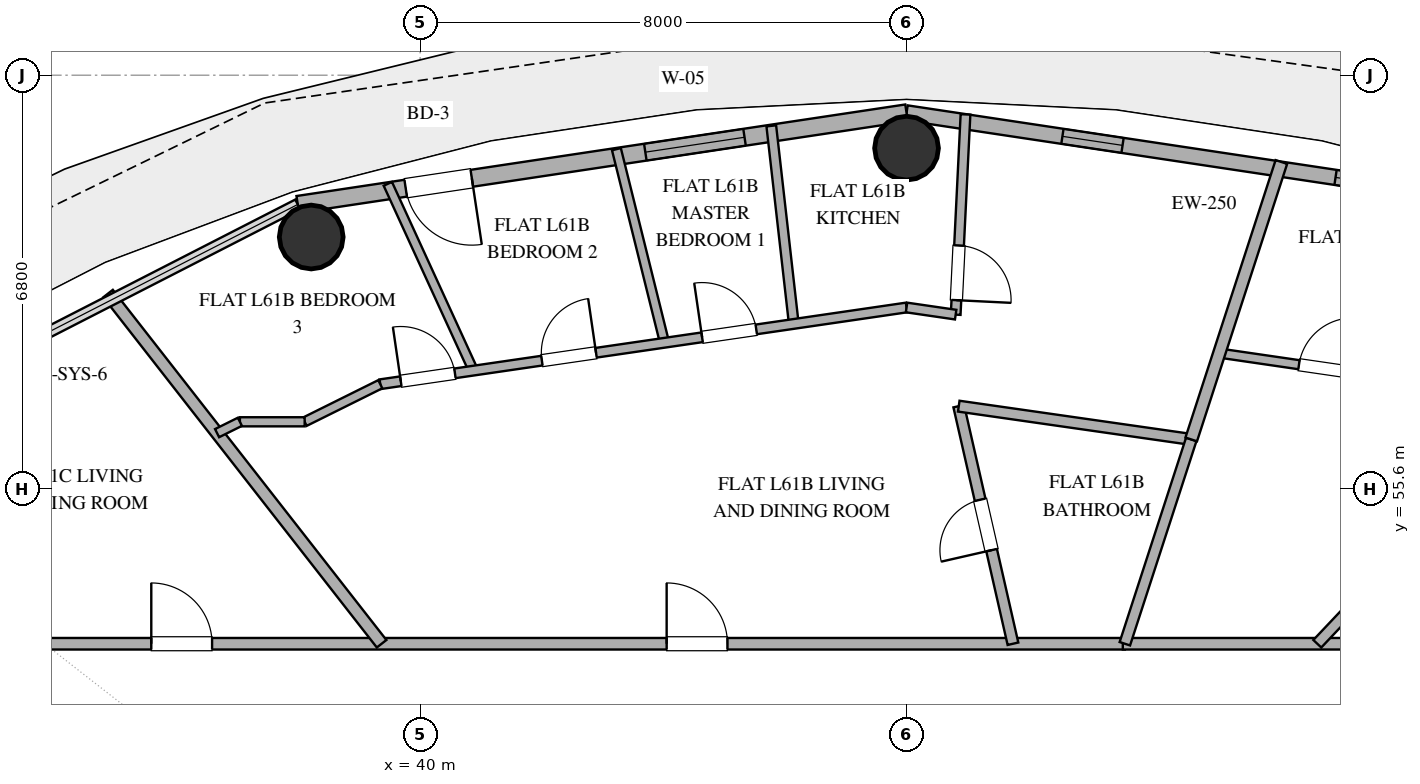
"""IFC4 building model, lengths in metres.
Left out: names, types, materials, properties, quantities, classifications, styles, units other than length and angle.
Written with IfcOpenShell. Run it as: python <this file> out.ifc"""

import sys

from ifc_helpers import new_model, si_unit, direction, frame, frame_2d, origin, origin_2d, place, context, subcontext, project, spatial, rectangle, hollow_circle, extrude, element, fill, save


model = new_model("IFC4")
c1 = context("Model", 3, precision=1e-05, world=origin(), true_north=direction((0.0, 1.0)))
c2 = subcontext(c1, "Body", "Model", "MODEL_VIEW")
j1 = project(units=[si_unit("LENGTHUNIT", "METRE"), si_unit("PLANEANGLEUNIT", "RADIAN")], contexts=[c1])
p1 = place(None, origin())
s1 = spatial("IfcSite", under=j1, at=p1, CompositionType="ELEMENT")
p2 = place(p1, origin())
s2 = spatial("IfcBuilding", under=s1, at=p2, CompositionType="ELEMENT")
p3 = place(p2, frame((0.0, 0.0, 238.8)))
s3 = spatial("IfcBuildingStorey", under=s2, at=p3, CompositionType="ELEMENT", Elevation=238.8)
for number, where, z_axis, x_axis in (
    (1, (48.0, 61.2, 0.0), (0.0, 0.0, 1.0), (1.0, 0.0, 0.0)),
    (2, (38.209, 59.739, 0.0), (0.0, 0.0, 1.0), (1.0, 0.0, 0.0)),
):
    element("IfcColumn", number, at=place(p3, frame(where, z_axis=z_axis, x_axis=x_axis)), inside=s3, PredefinedType="COLUMN", context=c2, shape_type="SweptSolid", body=[
        extrude(hollow_circle(Radius=0.525, WallThickness=0.028, at=origin_2d()), origin(), (0.0, 0.0, 1.0), 3.36),
    ])
p4 = place(p3, frame((58.013, 60.274, 0.0), z_axis=(0.0, 0.0, 1.0), x_axis=(-0.988882522213, 0.148698881169, 0.0)))
e3 = element("IfcWall", 3, at=p4, inside=s3, PredefinedType="SOLIDWALL", context=c2, shape_type="SweptSolid", body=[
    extrude(rectangle(XDim=10.125, YDim=0.25, at=frame_2d((5.062, 0.0))), origin(), (0.0, 0.0, 1.0), 3.36),
])
p5 = place(p4, frame((1.99, 0.0, 0.35)))
e4 = element("IfcOpeningElement", 4, at=p5, cuts=e3, PredefinedType="OPENING", context=c2, shape_type="SweptSolid", body=[
    extrude(rectangle(XDim=1.0, YDim=1.05, at=frame_2d((0.5, 0.525))), frame((0.0, 0.135, 0.0), z_axis=(0.0, -1.0, 0.0), x_axis=(1.0, 0.0, 0.0)), (0.0, 0.0, 1.0), 0.27),
])
p6 = place(p4, frame((6.533, 0.0, 1.42)))
e5 = element("IfcOpeningElement", 5, at=p6, cuts=e3, PredefinedType="OPENING", context=c2, shape_type="SweptSolid", body=[
    extrude(rectangle(XDim=1.0, YDim=1.05, at=frame_2d((0.5, 0.525))), frame((0.0, 0.135, 0.0), z_axis=(0.0, -1.0, 0.0), x_axis=(1.0, 0.0, 0.0)), (0.0, 0.0, 1.0), 0.27),
])
p7 = place(p3, frame((48.0, 61.78, 0.0), z_axis=(0.0, 0.0, 1.0), x_axis=(-0.988882522213, -0.148698881169, 0.0)))
e6 = element("IfcWall", 6, at=p7, inside=s3, PredefinedType="SOLIDWALL", context=c2, shape_type="SweptSolid", body=[
    extrude(rectangle(XDim=10.125, YDim=0.28, at=frame_2d((5.062, 0.0))), origin(), (0.0, 0.0, 1.0), 3.36),
])
p8 = place(p7, frame((2.694, 0.0, 0.85)))
e7 = element("IfcOpeningElement", 7, at=p8, cuts=e6, PredefinedType="OPENING", context=c2, shape_type="SweptSolid", body=[
    extrude(rectangle(XDim=1.65, YDim=2.0, at=frame_2d((0.825, 1.0))), frame((0.0, 0.15, 0.0), z_axis=(0.0, -1.0, 0.0), x_axis=(1.0, 0.0, 0.0)), (0.0, 0.0, 1.0), 0.3),
])
p9 = place(p7, frame((7.23, 0.0, 0.0)))
e8 = element("IfcOpeningElement", 8, at=p9, cuts=e6, PredefinedType="OPENING", context=c2, shape_type="SweptSolid", body=[
    extrude(rectangle(XDim=1.1, YDim=2.25, at=frame_2d((0.55, 1.125))), frame((0.0, 0.15, 0.0), z_axis=(0.0, -1.0, 0.0), x_axis=(1.0, 0.0, 0.0)), (0.0, 0.0, 1.0), 0.3),
])
p10 = place(p3, frame((32.75, 53.05, 0.0), z_axis=(0.0, 0.0, 1.0), x_axis=(1.0, 0.0, 0.0)))
e9 = element("IfcWall", 9, at=p10, inside=s3, PredefinedType="PARTITIONING", context=c2, shape_type="SweptSolid", body=[
    extrude(rectangle(XDim=18.84, YDim=0.19, at=frame_2d((9.42, 0.0))), origin(), (0.0, 0.0, 1.0), 2.72),
])
p11 = place(p10, frame((11.305, 0.0, 0.0)))
e10 = element("IfcOpeningElement", 10, at=p11, cuts=e9, PredefinedType="OPENING", context=c2, shape_type="SweptSolid", body=[
    extrude(rectangle(XDim=1.0, YDim=2.2, at=frame_2d((0.5, 1.1))), frame((0.0, 0.105, 0.0), z_axis=(0.0, -1.0, 0.0), x_axis=(1.0, 0.0, 0.0)), (0.0, 0.0, 1.0), 0.21),
])
p12 = place(p10, frame((2.829, 0.0, 0.0)))
e11 = element("IfcOpeningElement", 11, at=p12, cuts=e9, PredefinedType="OPENING", context=c2, shape_type="SweptSolid", body=[
    extrude(rectangle(XDim=1.0, YDim=2.2, at=frame_2d((0.5, 1.1))), frame((0.0, 0.105, 0.0), z_axis=(0.0, -1.0, 0.0), x_axis=(1.0, 0.0, 0.0)), (0.0, 0.0, 1.0), 0.21),
])
p13 = place(p3, frame((51.557, 53.05, 0.0), z_axis=(0.0, 0.0, 1.0), x_axis=(1.0, 0.0, 0.0)))
e12 = element("IfcWall", 12, at=p13, inside=s3, PredefinedType="PARTITIONING", context=c2, shape_type="SweptSolid", body=[
    extrude(rectangle(XDim=11.693, YDim=0.19, at=frame_2d((5.847, 0.0))), origin(), (0.0, 0.0, 1.0), 2.72),
])
p14 = place(p3, frame((39.367, 53.05, 0.0), z_axis=(0.0, 0.0, 1.0), x_axis=(-0.615657656631, 0.788013737083, 0.0)))
e13 = element("IfcWall", 13, at=p14, inside=s3, PredefinedType="PARTITIONING", context=c2, shape_type="SweptSolid", body=[
    extrude(rectangle(XDim=7.308, YDim=0.2, at=frame_2d((3.654, 0.0))), origin(), (0.0, 0.0, 1.0), 2.72),
])
p15 = place(p3, frame((49.75, 53.05, 0.0), z_axis=(0.0, 0.0, 1.0), x_axis=(-0.222474116201, 0.974938596846, 0.0)))
e14 = element("IfcWall", 14, at=p15, inside=s3, PredefinedType="PLUMBINGWALL", context=c2, shape_type="SweptSolid", body=[
    extrude(rectangle(XDim=4.008, YDim=0.18, at=frame_2d((2.004, 0.0))), origin(), (0.0, 0.0, 1.0), 2.72),
])
p16 = place(p15, frame((1.579, 0.0, 0.0)))
e15 = element("IfcOpeningElement", 15, at=p16, cuts=e14, PredefinedType="OPENING", context=c2, shape_type="SweptSolid", body=[
    extrude(rectangle(XDim=0.85, YDim=2.1, at=frame_2d((0.425, 1.05))), frame((0.0, 0.1, 0.0), z_axis=(0.0, -1.0, 0.0), x_axis=(1.0, 0.0, 0.0)), (0.0, 0.0, 1.0), 0.2),
])
p17 = place(p3, frame((48.859, 56.957, 0.0), z_axis=(0.0, 0.0, 1.0), x_axis=(0.989916598229, -0.141651433282, 0.0)))
e16 = element("IfcWall", 16, at=p17, inside=s3, PredefinedType="PLUMBINGWALL", context=c2, shape_type="SweptSolid", body=[
    extrude(rectangle(XDim=3.863, YDim=0.18, at=frame_2d((1.931, 0.0))), origin(), (0.0, 0.0, 1.0), 2.72),
])
p18 = place(p3, frame((53.144, 57.83, 0.0), z_axis=(0.0, 0.0, 1.0), x_axis=(0.98952683964, -0.144348999414, 0.0)))
e17 = element("IfcWall", 17, at=p18, inside=s3, PredefinedType="PARTITIONING", context=c2, shape_type="SweptSolid", body=[
    extrude(rectangle(XDim=3.548, YDim=0.15, at=frame_2d((1.774, 0.0))), origin(), (0.0, 0.0, 1.0), 2.72),
])
p19 = place(p18, frame((1.324, 0.0, 0.0)))
e18 = element("IfcOpeningElement", 18, at=p19, cuts=e17, PredefinedType="OPENING", context=c2, shape_type="SweptSolid", body=[
    extrude(rectangle(XDim=0.9, YDim=2.1, at=frame_2d((0.45, 1.05))), frame((0.0, 0.085, 0.0), z_axis=(0.0, -1.0, 0.0), x_axis=(1.0, 0.0, 0.0)), (0.0, 0.0, 1.0), 0.17),
])
p20 = place(p3, frame((52.682, 56.41, 0.0), z_axis=(0.0, 0.0, 1.0), x_axis=(-0.309025133622, -0.951053871655, 0.0)))
e19 = element("IfcWall", 19, at=p20, inside=s3, PredefinedType="PLUMBINGWALL", context=c2, shape_type="SweptSolid", body=[
    extrude(rectangle(XDim=3.533, YDim=0.18, at=frame_2d((1.767, 0.0))), origin(), (0.0, 0.0, 1.0), 2.72),
])
p21 = place(p3, frame((40.877, 57.541, 0.0), z_axis=(0.0, 0.0, 1.0), x_axis=(-0.41664724869, 0.90906824285, 0.0)))
e20 = element("IfcWall", 20, at=p21, inside=s3, PredefinedType="PARTITIONING", context=c2, shape_type="SweptSolid", body=[
    extrude(rectangle(XDim=3.38, YDim=0.15, at=frame_2d((1.69, 0.0))), origin(), (0.0, 0.0, 1.0), 2.72),
])
p22 = place(p3, frame((54.165, 60.973, 0.0), z_axis=(0.0, 0.0, 1.0), x_axis=(-0.309012424199, -0.951058001223, 0.0)))
e21 = element("IfcWall", 21, at=p22, inside=s3, PredefinedType="PARTITIONING", context=c2, shape_type="SweptSolid", body=[
    extrude(rectangle(XDim=4.797, YDim=0.2, at=frame_2d((2.399, 0.0))), origin(), (0.0, 0.0, 1.0), 2.72),
])
p23 = place(p3, frame((57.021, 55.446, 0.0), z_axis=(0.0, 0.0, 1.0), x_axis=(-0.686947406922, -0.726707135044, 0.0)))
e22 = element("IfcWall", 22, at=p23, inside=s3, PredefinedType="PLUMBINGWALL", context=c2, shape_type="SweptSolid", body=[
    extrude(rectangle(XDim=3.297, YDim=0.18, at=frame_2d((1.649, 0.0))), origin(), (0.0, 0.0, 1.0), 2.72),
])
p24 = place(p23, frame((1.224, 0.0, 0.0)))
e23 = element("IfcOpeningElement", 23, at=p24, cuts=e22, PredefinedType="OPENING", context=c2, shape_type="SweptSolid", body=[
    extrude(rectangle(XDim=0.85, YDim=2.1, at=frame_2d((0.425, 1.05))), frame((0.0, 0.1, 0.0), z_axis=(0.0, -1.0, 0.0), x_axis=(1.0, 0.0, 0.0)), (0.0, 0.0, 1.0), 0.2),
])
p25 = place(p3, frame((48.969, 61.755, 0.0), z_axis=(0.0, 0.0, 1.0), x_axis=(-0.04902528139, -0.998797537935, 0.0)))
e24 = element("IfcWall", 24, at=p25, inside=s3, PredefinedType="PLUMBINGWALL", context=c2, shape_type="SweptSolid", body=[
    extrude(rectangle(XDim=3.297, YDim=0.16, at=frame_2d((1.648, 0.0))), origin(), (0.0, 0.0, 1.0), 2.72),
])
p26 = place(p25, frame((2.158, 0.0, 0.0)))
e25 = element("IfcOpeningElement", 25, at=p26, cuts=e24, PredefinedType="OPENING", context=c2, shape_type="SweptSolid", body=[
    extrude(rectangle(XDim=0.9, YDim=2.1, at=frame_2d((0.45, 1.05))), frame((0.0, 0.09, 0.0), z_axis=(0.0, -1.0, 0.0), x_axis=(1.0, 0.0, 0.0)), (0.0, 0.0, 1.0), 0.18),
])
p27 = place(p3, frame((43.229, 61.183, 0.0), z_axis=(0.0, 0.0, 1.0), x_axis=(0.241414802643, -0.970422018023, 0.0)))
e26 = element("IfcWall", 26, at=p27, inside=s3, PredefinedType="PARTITIONING", context=c2, shape_type="SweptSolid", body=[
    extrude(rectangle(XDim=3.281, YDim=0.15, at=frame_2d((1.64, 0.0))), origin(), (0.0, 0.0, 1.0), 2.72),
])
p28 = place(p3, frame((46.146, 58.31, 0.0), z_axis=(0.0, 0.0, 1.0), x_axis=(-0.11298154415, 0.993597086691, 0.0)))
e27 = element("IfcWall", 27, at=p28, inside=s3, PredefinedType="PLUMBINGWALL", context=c2, shape_type="SweptSolid", body=[
    extrude(rectangle(XDim=3.278, YDim=0.16, at=frame_2d((1.639, 0.0))), origin(), (0.0, 0.0, 1.0), 2.72),
])
p29 = place(p3, frame((39.345, 57.318, 0.0), z_axis=(0.0, 0.0, 1.0), x_axis=(0.989540121389, 0.144257922351, 0.0)))
e28 = element("IfcWall", 28, at=p29, inside=s3, PredefinedType="PLUMBINGWALL", context=c2, shape_type="SweptSolid", body=[
    extrude(rectangle(XDim=8.746, YDim=0.16, at=frame_2d((4.373, 0.0))), origin(), (0.0, 0.0, 1.0), 2.72),
])
p30 = place(p29, frame((2.686, 0.0, 0.0)))
e29 = element("IfcOpeningElement", 29, at=p30, cuts=e28, PredefinedType="OPENING", context=c2, shape_type="SweptSolid", body=[
    extrude(rectangle(XDim=0.9, YDim=2.1, at=frame_2d((0.45, 1.05))), frame((0.0, 0.09, 0.0), z_axis=(0.0, -1.0, 0.0), x_axis=(1.0, 0.0, 0.0)), (0.0, 0.0, 1.0), 0.18),
])
p31 = place(p29, frame((5.349, 0.0, 0.0)))
e30 = element("IfcOpeningElement", 30, at=p31, cuts=e28, PredefinedType="OPENING", context=c2, shape_type="SweptSolid", body=[
    extrude(rectangle(XDim=0.9, YDim=2.1, at=frame_2d((0.45, 1.05))), frame((0.0, 0.09, 0.0), z_axis=(0.0, -1.0, 0.0), x_axis=(1.0, 0.0, 0.0)), (0.0, 0.0, 1.0), 0.18),
])
p32 = place(p29, frame((0.341, 0.0, 0.0)))
e31 = element("IfcOpeningElement", 31, at=p32, cuts=e28, PredefinedType="OPENING", context=c2, shape_type="SweptSolid", body=[
    extrude(rectangle(XDim=0.9, YDim=2.1, at=frame_2d((0.45, 1.05))), frame((0.0, 0.09, 0.0), z_axis=(0.0, -1.0, 0.0), x_axis=(1.0, 0.0, 0.0)), (0.0, 0.0, 1.0), 0.18),
])
p33 = place(p3, frame((38.101, 56.7, 0.0), z_axis=(0.0, 0.0, 1.0), x_axis=(0.895584310315, 0.444891833053, 0.0)))
e32 = element("IfcWall", 32, at=p33, inside=s3, PredefinedType="PARTITIONING", context=c2, shape_type="SweptSolid", body=[
    extrude(rectangle(XDim=1.389, YDim=0.15, at=frame_2d((0.694, 0.0))), origin(), (0.0, 0.0, 1.0), 2.72),
])
p34 = place(p3, frame((37.036, 56.7, 0.0), z_axis=(0.0, 0.0, 1.0), x_axis=(1.0, 0.0, 0.0)))
e33 = element("IfcWall", 33, at=p34, inside=s3, PredefinedType="PARTITIONING", context=c2, shape_type="SweptSolid", body=[
    extrude(rectangle(XDim=1.065, YDim=0.15, at=frame_2d((0.533, 0.0))), origin(), (0.0, 0.0, 1.0), 2.72),
])
p35 = place(p3, frame((48.808, 58.462, 0.0), z_axis=(0.0, 0.0, 1.0), x_axis=(-0.989514290885, 0.144434996222, 0.0)))
e34 = element("IfcWall", 34, at=p35, inside=s3, PredefinedType="PLUMBINGWALL", context=c2, shape_type="SweptSolid", body=[
    extrude(rectangle(XDim=0.816, YDim=0.16, at=frame_2d((0.408, 0.0))), origin(), (0.0, 0.0, 1.0), 2.72),
])
p36 = place(p3, frame((36.661, 56.513, 0.0), z_axis=(0.0, 0.0, 1.0), x_axis=(0.895473432012, 0.445114965554, 0.0)))
e35 = element("IfcWall", 35, at=p36, inside=s3, PredefinedType="PARTITIONING", context=c2, shape_type="SweptSolid", body=[
    extrude(rectangle(XDim=0.419, YDim=0.15, at=frame_2d((0.209, 0.0))), origin(), (0.0, 0.0, 1.0), 2.72),
])
p37 = place(p8, origin())
e36 = element("IfcWindow", 36, at=p37, inside=s3, PartitioningType="SINGLE_PANEL", PredefinedType="WINDOW", context=c2, shape_type="SweptSolid", body=[
    extrude(rectangle(XDim=1.65, YDim=2.0, at=frame_2d((0.825, 1.0))), frame((0.0, 0.03, 0.0), z_axis=(0.0, -1.0, 0.0), x_axis=(1.0, 0.0, 0.0)), (0.0, 0.0, 1.0), 0.06),
])
fill(e7, e36)
p38 = place(p9, origin())
e37 = element("IfcDoor", 37, at=p38, inside=s3, OperationType="SINGLE_SWING_LEFT", PredefinedType="DOOR", context=c2, shape_type="SweptSolid", body=[
    extrude(rectangle(XDim=1.1, YDim=2.25, at=frame_2d((0.55, 1.125))), frame((0.0, 0.025, 0.0), z_axis=(0.0, -1.0, 0.0), x_axis=(1.0, 0.0, 0.0)), (0.0, 0.0, 1.0), 0.05),
])
fill(e8, e37)
p39 = place(p5, origin())
e38 = element("IfcWindow", 38, at=p39, inside=s3, PartitioningType="SINGLE_PANEL", PredefinedType="WINDOW", context=c2, shape_type="SweptSolid", body=[
    extrude(rectangle(XDim=1.0, YDim=1.05, at=frame_2d((0.5, 0.525))), frame((0.0, 0.03, 0.0), z_axis=(0.0, -1.0, 0.0), x_axis=(1.0, 0.0, 0.0)), (0.0, 0.0, 1.0), 0.06),
])
fill(e4, e38)
p40 = place(p6, origin())
e39 = element("IfcWindow", 39, at=p40, inside=s3, PartitioningType="SINGLE_PANEL", PredefinedType="WINDOW", context=c2, shape_type="SweptSolid", body=[
    extrude(rectangle(XDim=1.0, YDim=1.05, at=frame_2d((0.5, 0.525))), frame((0.0, 0.03, 0.0), z_axis=(0.0, -1.0, 0.0), x_axis=(1.0, 0.0, 0.0)), (0.0, 0.0, 1.0), 0.06),
])
fill(e5, e39)
p41 = place(p11, origin())
e40 = element("IfcDoor", 40, at=p41, inside=s3, OperationType="SINGLE_SWING_LEFT", PredefinedType="DOOR", context=c2, shape_type="SweptSolid", body=[
    extrude(rectangle(XDim=1.0, YDim=2.2, at=frame_2d((0.5, 1.1))), frame((0.0, 0.025, 0.0), z_axis=(0.0, -1.0, 0.0), x_axis=(1.0, 0.0, 0.0)), (0.0, 0.0, 1.0), 0.05),
])
fill(e10, e40)
p42 = place(p12, origin())
e41 = element("IfcDoor", 41, at=p42, inside=s3, OperationType="SINGLE_SWING_LEFT", PredefinedType="DOOR", context=c2, shape_type="SweptSolid", body=[
    extrude(rectangle(XDim=1.0, YDim=2.2, at=frame_2d((0.5, 1.1))), frame((0.0, 0.025, 0.0), z_axis=(0.0, -1.0, 0.0), x_axis=(1.0, 0.0, 0.0)), (0.0, 0.0, 1.0), 0.05),
])
fill(e11, e41)
p43 = place(p16, origin())
e42 = element("IfcDoor", 42, at=p43, inside=s3, OperationType="SINGLE_SWING_LEFT", PredefinedType="DOOR", context=c2, shape_type="SweptSolid", body=[
    extrude(rectangle(XDim=0.85, YDim=2.1, at=frame_2d((0.425, 1.05))), frame((0.0, 0.025, 0.0), z_axis=(0.0, -1.0, 0.0), x_axis=(1.0, 0.0, 0.0)), (0.0, 0.0, 1.0), 0.05),
])
fill(e15, e42)
p44 = place(p19, origin())
e43 = element("IfcDoor", 43, at=p44, inside=s3, OperationType="SINGLE_SWING_RIGHT", PredefinedType="DOOR", context=c2, shape_type="SweptSolid", body=[
    extrude(rectangle(XDim=0.9, YDim=2.1, at=frame_2d((0.45, 1.05))), frame((0.0, 0.025, 0.0), z_axis=(0.0, -1.0, 0.0), x_axis=(1.0, 0.0, 0.0)), (0.0, 0.0, 1.0), 0.05),
])
fill(e18, e43)
p45 = place(p26, origin())
e44 = element("IfcDoor", 44, at=p45, inside=s3, OperationType="SINGLE_SWING_RIGHT", PredefinedType="DOOR", context=c2, shape_type="SweptSolid", body=[
    extrude(rectangle(XDim=0.9, YDim=2.1, at=frame_2d((0.45, 1.05))), frame((0.0, 0.025, 0.0), z_axis=(0.0, -1.0, 0.0), x_axis=(1.0, 0.0, 0.0)), (0.0, 0.0, 1.0), 0.05),
])
fill(e25, e44)
p46 = place(p30, origin())
e45 = element("IfcDoor", 45, at=p46, inside=s3, OperationType="SINGLE_SWING_RIGHT", PredefinedType="DOOR", context=c2, shape_type="SweptSolid", body=[
    extrude(rectangle(XDim=0.9, YDim=2.1, at=frame_2d((0.45, 1.05))), frame((0.0, 0.025, 0.0), z_axis=(0.0, -1.0, 0.0), x_axis=(1.0, 0.0, 0.0)), (0.0, 0.0, 1.0), 0.05),
])
fill(e29, e45)
p47 = place(p31, origin())
e46 = element("IfcDoor", 46, at=p47, inside=s3, OperationType="SINGLE_SWING_LEFT", PredefinedType="DOOR", context=c2, shape_type="SweptSolid", body=[
    extrude(rectangle(XDim=0.9, YDim=2.1, at=frame_2d((0.45, 1.05))), frame((0.0, 0.025, 0.0), z_axis=(0.0, -1.0, 0.0), x_axis=(1.0, 0.0, 0.0)), (0.0, 0.0, 1.0), 0.05),
])
fill(e30, e46)
p48 = place(p32, origin())
e47 = element("IfcDoor", 47, at=p48, inside=s3, OperationType="SINGLE_SWING_LEFT", PredefinedType="DOOR", context=c2, shape_type="SweptSolid", body=[
    extrude(rectangle(XDim=0.9, YDim=2.1, at=frame_2d((0.45, 1.05))), frame((0.0, 0.025, 0.0), z_axis=(0.0, -1.0, 0.0), x_axis=(1.0, 0.0, 0.0)), (0.0, 0.0, 1.0), 0.05),
])
fill(e31, e47)
save(model, sys.argv[1])
